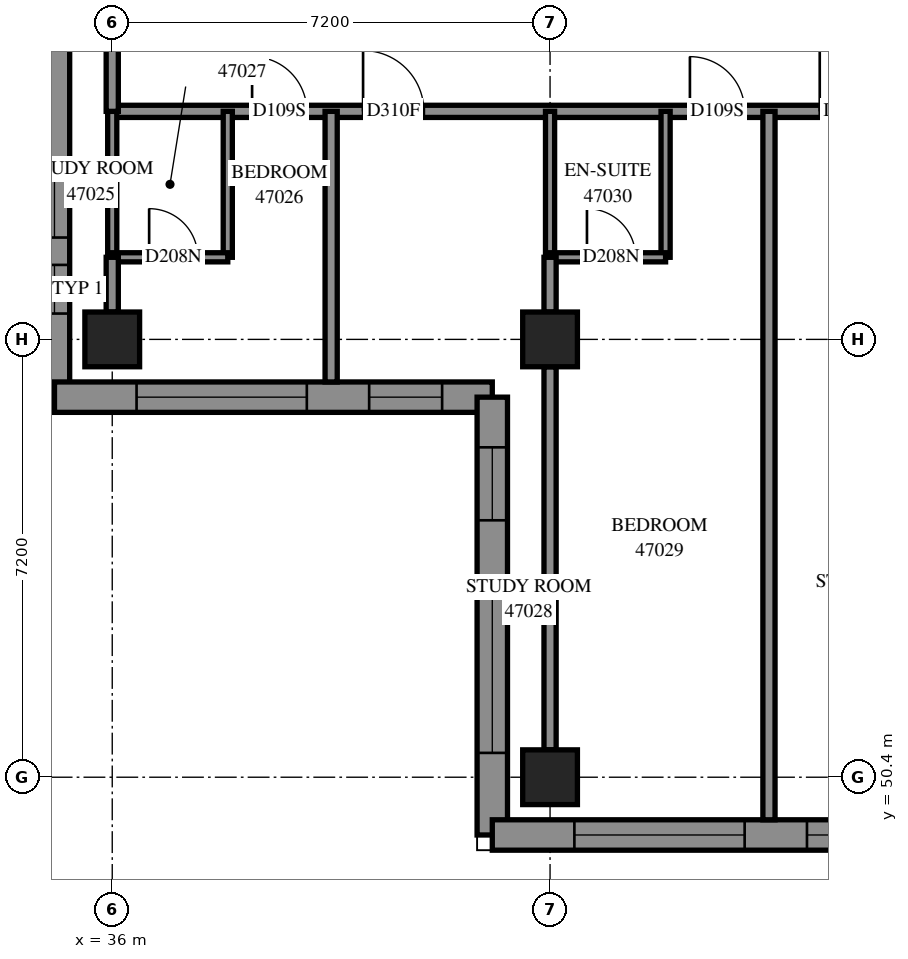
"""IFC4 building model, lengths in metres.
Left out: names, types, materials, properties, quantities, classifications, styles, units other than length and angle.
Written with IfcOpenShell. Run it as: python <this file> out.ifc"""

import sys

from ifc_helpers import new_model, si_unit, direction, frame, frame_2d, origin, origin_2d, place, context, subcontext, project, spatial, polyline, rectangle, outline, extrude, element, fill, save


model = new_model("IFC4")
c1 = context("Model", 3, precision=1e-05, world=origin(), true_north=direction((0.0, 1.0)))
c2 = subcontext(c1, "Body", "Model", "MODEL_VIEW")
j1 = project(units=[si_unit("LENGTHUNIT", "METRE"), si_unit("PLANEANGLEUNIT", "RADIAN")], contexts=[c1])
p1 = place(None, origin())
s1 = spatial("IfcSite", under=j1, at=p1, CompositionType="ELEMENT")
p2 = place(p1, origin())
s2 = spatial("IfcBuilding", under=s1, at=p2, CompositionType="ELEMENT")
p3 = place(p2, frame((0.0, 0.0, 172.8)))
s3 = spatial("IfcBuildingStorey", under=s2, at=p3, CompositionType="ELEMENT", Elevation=172.8)
for number, where, z_axis, x_axis in (
    (1, (36.0, 57.6, 0.0), (0.0, 0.0, 1.0), (1.0, 0.0, 0.0)),
    (2, (43.2, 50.4, 0.0), (0.0, 0.0, 1.0), (1.0, 0.0, 0.0)),
    (3, (43.2, 57.6, 0.0), (0.0, 0.0, 1.0), (1.0, 0.0, 0.0)),
):
    element("IfcColumn", number, at=place(p3, frame(where, z_axis=z_axis, x_axis=x_axis)), inside=s3, PredefinedType="COLUMN", context=c2, shape_type="SweptSolid", body=[
        extrude(rectangle(XDim=0.9, YDim=0.9, at=origin_2d()), origin(), (0.0, 0.0, 1.0), 3.1),
    ])
p4 = place(p3, frame((35.05, 62.617, 0.0), z_axis=(0.0, 0.0, 1.0), x_axis=(0.0, -1.0, 0.0)))
e4 = element("IfcWall", 4, at=p4, inside=s3, PredefinedType="SOLIDWALL", context=c2, shape_type="SweptSolid", body=[
    extrude(outline(polyline([(0.25, -0.25), (6.217, -0.25), (5.717, 0.25), (-0.25, 0.25), (0.25, -0.25)])), origin(), (0.0, 0.0, 1.0), 3.1),
])
p5 = place(p4, frame((2.042, 0.0, 0.45)))
e5 = element("IfcOpeningElement", 5, at=p5, cuts=e4, PredefinedType="OPENING", context=c2, shape_type="SweptSolid", body=[
    extrude(rectangle(XDim=1.3, YDim=2.5, at=frame_2d((0.65, 1.25))), frame((0.0, 0.26, 0.0), z_axis=(0.0, -1.0, 0.0), x_axis=(1.0, 0.0, 0.0)), (0.0, 0.0, 1.0), 0.52),
])
p6 = place(p4, frame((3.792, 0.0, 0.45)))
e6 = element("IfcOpeningElement", 6, at=p6, cuts=e4, PredefinedType="OPENING", context=c2, shape_type="SweptSolid", body=[
    extrude(rectangle(XDim=0.8, YDim=2.5, at=frame_2d((0.4, 1.25))), frame((0.0, 0.26, 0.0), z_axis=(0.0, -1.0, 0.0), x_axis=(1.0, 0.0, 0.0)), (0.0, 0.0, 1.0), 0.52),
])
p7 = place(p3, frame((35.05, 56.65, 0.0), z_axis=(0.0, 0.0, 1.0), x_axis=(1.0, 0.0, 0.0)))
e7 = element("IfcWall", 7, at=p7, inside=s3, PredefinedType="SOLIDWALL", context=c2, shape_type="SweptSolid", body=[
    extrude(outline(polyline([(-0.25, -0.25), (6.95, -0.25), (7.45, 0.25), (0.25, 0.25), (-0.25, -0.25)])), origin(), (0.0, 0.0, 1.0), 3.1),
])
p8 = place(p7, frame((1.35, 0.0, 0.45)))
e8 = element("IfcOpeningElement", 8, at=p8, cuts=e7, PredefinedType="OPENING", context=c2, shape_type="SweptSolid", body=[
    extrude(rectangle(XDim=2.8, YDim=2.5, at=frame_2d((1.4, 1.25))), frame((0.0, 0.26, 0.0), z_axis=(0.0, -1.0, 0.0), x_axis=(1.0, 0.0, 0.0)), (0.0, 0.0, 1.0), 0.52),
])
p9 = place(p7, frame((5.175, 0.0, 0.45)))
e9 = element("IfcOpeningElement", 9, at=p9, cuts=e7, PredefinedType="OPENING", context=c2, shape_type="SweptSolid", body=[
    extrude(rectangle(XDim=1.2, YDim=2.5, at=frame_2d((0.6, 1.25))), frame((0.0, 0.26, 0.0), z_axis=(0.0, -1.0, 0.0), x_axis=(1.0, 0.0, 0.0)), (0.0, 0.0, 1.0), 0.52),
])
p10 = place(p3, frame((42.25, 56.65, 0.0), z_axis=(0.0, 0.0, 1.0), x_axis=(0.0, -1.0, 0.0)))
e10 = element("IfcWall", 10, at=p10, inside=s3, PredefinedType="SOLIDWALL", context=c2, shape_type="SweptSolid", body=[
    extrude(outline(polyline([(0.25, -0.25), (7.45, -0.25), (6.95, 0.25), (-0.25, 0.25), (0.25, -0.25)])), origin(), (0.0, 0.0, 1.0), 3.1),
])
p11 = place(p10, frame((3.05, 0.0, 0.45)))
e11 = element("IfcOpeningElement", 11, at=p11, cuts=e10, PredefinedType="OPENING", context=c2, shape_type="SweptSolid", body=[
    extrude(rectangle(XDim=2.8, YDim=2.5, at=frame_2d((1.4, 1.25))), frame((0.0, 0.26, 0.0), z_axis=(0.0, -1.0, 0.0), x_axis=(1.0, 0.0, 0.0)), (0.0, 0.0, 1.0), 0.52),
])
p12 = place(p10, frame((0.825, 0.0, 0.45)))
e12 = element("IfcOpeningElement", 12, at=p12, cuts=e10, PredefinedType="OPENING", context=c2, shape_type="SweptSolid", body=[
    extrude(rectangle(XDim=1.2, YDim=2.5, at=frame_2d((0.6, 1.25))), frame((0.0, 0.26, 0.0), z_axis=(0.0, -1.0, 0.0), x_axis=(1.0, 0.0, 0.0)), (0.0, 0.0, 1.0), 0.52),
])
p13 = place(p3, frame((42.25, 49.45, 0.0), z_axis=(0.0, 0.0, 1.0), x_axis=(1.0, 0.0, 0.0)))
e13 = element("IfcWall", 13, at=p13, inside=s3, PredefinedType="SOLIDWALL", context=c2, shape_type="SweptSolid", body=[
    extrude(outline(polyline([(-0.25, -0.25), (6.95, -0.25), (7.45, 0.25), (0.25, 0.25), (-0.25, -0.25)])), origin(), (0.0, 0.0, 1.0), 3.1),
])
p14 = place(p13, frame((1.35, 0.0, 0.45)))
e14 = element("IfcOpeningElement", 14, at=p14, cuts=e13, PredefinedType="OPENING", context=c2, shape_type="SweptSolid", body=[
    extrude(rectangle(XDim=2.8, YDim=2.5, at=frame_2d((1.4, 1.25))), frame((0.0, 0.26, 0.0), z_axis=(0.0, -1.0, 0.0), x_axis=(1.0, 0.0, 0.0)), (0.0, 0.0, 1.0), 0.52),
])
p15 = place(p13, frame((5.175, 0.0, 0.45)))
e15 = element("IfcOpeningElement", 15, at=p15, cuts=e13, PredefinedType="OPENING", context=c2, shape_type="SweptSolid", body=[
    extrude(rectangle(XDim=1.2, YDim=2.5, at=frame_2d((0.6, 1.25))), frame((0.0, 0.26, 0.0), z_axis=(0.0, -1.0, 0.0), x_axis=(1.0, 0.0, 0.0)), (0.0, 0.0, 1.0), 0.52),
])
p16 = place(p3, frame((36.0, 61.35, 0.0), z_axis=(0.0, 0.0, 1.0), x_axis=(1.0, 0.0, 0.0)))
e16 = element("IfcWall", 16, at=p16, inside=s3, PredefinedType="PARTITIONING", context=c2, shape_type="SweptSolid", body=[
    extrude(rectangle(XDim=16.95, YDim=0.2, at=frame_2d((8.475, 0.0))), origin(), (0.0, 0.0, 1.0), 3.1),
])
p17 = place(p16, frame((2.3, 0.0, 0.0)))
e17 = element("IfcOpeningElement", 17, at=p17, cuts=e16, PredefinedType="OPENING", context=c2, shape_type="SweptSolid", body=[
    extrude(rectangle(XDim=0.9, YDim=2.1, at=frame_2d((0.45, 1.05))), frame((0.0, 0.11, 0.0), z_axis=(0.0, -1.0, 0.0), x_axis=(1.0, 0.0, 0.0)), (0.0, 0.0, 1.0), 0.22),
])
p18 = place(p16, frame((4.125, 0.0, 0.0)))
e18 = element("IfcOpeningElement", 18, at=p18, cuts=e16, PredefinedType="OPENING", context=c2, shape_type="SweptSolid", body=[
    extrude(rectangle(XDim=1.0, YDim=2.1, at=frame_2d((0.5, 1.05))), frame((0.0, 0.11, 0.0), z_axis=(0.0, -1.0, 0.0), x_axis=(1.0, 0.0, 0.0)), (0.0, 0.0, 1.0), 0.22),
])
p19 = place(p16, frame((9.5, 0.0, 0.0)))
e19 = element("IfcOpeningElement", 19, at=p19, cuts=e16, PredefinedType="OPENING", context=c2, shape_type="SweptSolid", body=[
    extrude(rectangle(XDim=0.9, YDim=2.1, at=frame_2d((0.45, 1.05))), frame((0.0, 0.11, 0.0), z_axis=(0.0, -1.0, 0.0), x_axis=(1.0, 0.0, 0.0)), (0.0, 0.0, 1.0), 0.22),
])
p20 = place(p16, frame((11.635, 0.0, 0.0)))
e20 = element("IfcOpeningElement", 20, at=p20, cuts=e16, PredefinedType="OPENING", context=c2, shape_type="SweptSolid", body=[
    extrude(rectangle(XDim=1.0, YDim=2.1, at=frame_2d((0.5, 1.05))), frame((0.0, 0.11, 0.0), z_axis=(0.0, -1.0, 0.0), x_axis=(1.0, 0.0, 0.0)), (0.0, 0.0, 1.0), 0.22),
])
p21 = place(p16, frame((15.803, 0.0, 0.0)))
e21 = element("IfcOpeningElement", 21, at=p21, cuts=e16, PredefinedType="OPENING", context=c2, shape_type="SweptSolid", body=[
    extrude(rectangle(XDim=1.0, YDim=2.1, at=frame_2d((0.5, 1.05))), frame((0.0, 0.11, 0.0), z_axis=(0.0, -1.0, 0.0), x_axis=(1.0, 0.0, 0.0)), (0.0, 0.0, 1.0), 0.22),
])
p22 = place(p3, frame((46.8, 49.7, 0.0), z_axis=(0.0, 0.0, 1.0), x_axis=(0.0, 1.0, 0.0)))
e22 = element("IfcWall", 22, at=p22, inside=s3, PredefinedType="PARTITIONING", context=c2, shape_type="SweptSolid", body=[
    extrude(rectangle(XDim=11.65, YDim=0.2, at=frame_2d((5.825, 0.0))), origin(), (0.0, 0.0, 1.0), 3.1),
])
p23 = place(p3, frame((43.2, 50.85, 0.0), z_axis=(0.0, 0.0, 1.0), x_axis=(0.0, 1.0, 0.0)))
e23 = element("IfcWall", 23, at=p23, inside=s3, PredefinedType="PARTITIONING", context=c2, shape_type="SweptSolid", body=[
    extrude(rectangle(XDim=6.3, YDim=0.2, at=frame_2d((3.15, 0.0))), origin(), (0.0, 0.0, 1.0), 2.6),
])
p24 = place(p3, frame((39.6, 56.9, 0.0), z_axis=(0.0, 0.0, 1.0), x_axis=(0.0, 1.0, 0.0)))
e24 = element("IfcWall", 24, at=p24, inside=s3, PredefinedType="PARTITIONING", context=c2, shape_type="SweptSolid", body=[
    extrude(rectangle(XDim=4.45, YDim=0.2, at=frame_2d((2.225, 0.0))), origin(), (0.0, 0.0, 1.0), 3.1),
])
p25 = place(p3, frame((37.9, 58.95, 0.0), z_axis=(0.0, 0.0, 1.0), x_axis=(0.0, 1.0, 0.0)))
e25 = element("IfcWall", 25, at=p25, inside=s3, PredefinedType="PARTITIONING", context=c2, shape_type="SweptSolid", body=[
    extrude(rectangle(XDim=2.4, YDim=0.15, at=frame_2d((1.2, 0.0))), origin(), (0.0, 0.0, 1.0), 3.1),
])
p26 = place(p3, frame((36.0, 58.95, 0.0), z_axis=(0.0, 0.0, 1.0), x_axis=(0.0, 1.0, 0.0)))
e26 = element("IfcWall", 26, at=p26, inside=s3, PredefinedType="PARTITIONING", context=c2, shape_type="SweptSolid", body=[
    extrude(rectangle(XDim=2.4, YDim=0.15, at=frame_2d((1.2, 0.0))), origin(), (0.0, 0.0, 1.0), 2.6),
])
for number, where, z_axis, x_axis in (
    (27, (45.1, 58.95, 0.0), (0.0, 0.0, 1.0), (0.0, 1.0, 0.0)),
    (28, (43.2, 58.95, 0.0), (0.0, 0.0, 1.0), (0.0, 1.0, 0.0)),
):
    element("IfcWall", number, at=place(p3, frame(where, z_axis=z_axis, x_axis=x_axis)), inside=s3, PredefinedType="PARTITIONING", context=c2, shape_type="SweptSolid", body=[
        extrude(rectangle(XDim=2.4, YDim=0.15, at=frame_2d((1.2, 0.0))), origin(), (0.0, 0.0, 1.0), 3.1),
    ])
p27 = place(p3, frame((36.0, 61.35, 0.0), z_axis=(0.0, 0.0, 1.0), x_axis=(0.0, 1.0, 0.0)))
e29 = element("IfcWall", 29, at=p27, inside=s3, PredefinedType="PARTITIONING", context=c2, shape_type="SweptSolid", body=[
    extrude(rectangle(XDim=2.1, YDim=0.2, at=frame_2d((1.05, 0.0))), origin(), (0.0, 0.0, 1.0), 2.6),
])
p28 = place(p3, frame((36.0, 58.95, 0.0), z_axis=(0.0, 0.0, 1.0), x_axis=(1.0, 0.0, 0.0)))
e30 = element("IfcWall", 30, at=p28, inside=s3, PredefinedType="PARTITIONING", context=c2, shape_type="SweptSolid", body=[
    extrude(rectangle(XDim=1.9, YDim=0.15, at=frame_2d((0.95, 0.0))), origin(), (0.0, 0.0, 1.0), 3.1),
])
p29 = place(p28, frame((0.607, 0.0, 0.0)))
e31 = element("IfcOpeningElement", 31, at=p29, cuts=e30, PredefinedType="OPENING", context=c2, shape_type="SweptSolid", body=[
    extrude(rectangle(XDim=0.8, YDim=2.1, at=frame_2d((0.4, 1.05))), frame((0.0, 0.085, 0.0), z_axis=(0.0, -1.0, 0.0), x_axis=(1.0, 0.0, 0.0)), (0.0, 0.0, 1.0), 0.17),
])
p30 = place(p3, frame((43.2, 58.95, 0.0), z_axis=(0.0, 0.0, 1.0), x_axis=(1.0, 0.0, 0.0)))
e32 = element("IfcWall", 32, at=p30, inside=s3, PredefinedType="PARTITIONING", context=c2, shape_type="SweptSolid", body=[
    extrude(rectangle(XDim=1.9, YDim=0.15, at=frame_2d((0.95, 0.0))), origin(), (0.0, 0.0, 1.0), 3.1),
])
p31 = place(p30, frame((0.607, 0.0, 0.0)))
e33 = element("IfcOpeningElement", 33, at=p31, cuts=e32, PredefinedType="OPENING", context=c2, shape_type="SweptSolid", body=[
    extrude(rectangle(XDim=0.8, YDim=2.1, at=frame_2d((0.4, 1.05))), frame((0.0, 0.085, 0.0), z_axis=(0.0, -1.0, 0.0), x_axis=(1.0, 0.0, 0.0)), (0.0, 0.0, 1.0), 0.17),
])
p32 = place(p3, frame((36.0, 58.05, 0.0), z_axis=(0.0, 0.0, 1.0), x_axis=(0.0, 1.0, 0.0)))
e34 = element("IfcWall", 34, at=p32, inside=s3, PredefinedType="PARTITIONING", context=c2, shape_type="SweptSolid", body=[
    extrude(rectangle(XDim=0.9, YDim=0.2, at=frame_2d((0.45, 0.0))), origin(), (0.0, 0.0, 1.0), 2.6),
])
p33 = place(p3, frame((43.2, 58.05, 0.0), z_axis=(0.0, 0.0, 1.0), x_axis=(0.0, 1.0, 0.0)))
e35 = element("IfcWall", 35, at=p33, inside=s3, PredefinedType="PARTITIONING", context=c2, shape_type="SweptSolid", body=[
    extrude(rectangle(XDim=0.9, YDim=0.2, at=frame_2d((0.45, 0.0))), origin(), (0.0, 0.0, 1.0), 3.1),
])
p34 = place(p8, origin())
e36 = element("IfcWindow", 36, at=p34, inside=s3, PartitioningType="SINGLE_PANEL", PredefinedType="WINDOW", context=c2, shape_type="SweptSolid", body=[
    extrude(rectangle(XDim=2.8, YDim=2.5, at=frame_2d((1.4, 1.25))), frame((0.0, 0.18, 0.0), z_axis=(0.0, -1.0, 0.0), x_axis=(1.0, 0.0, 0.0)), (0.0, 0.0, 1.0), 0.06),
])
fill(e8, e36)
p35 = place(p9, origin())
e37 = element("IfcWindow", 37, at=p35, inside=s3, PartitioningType="SINGLE_PANEL", PredefinedType="WINDOW", context=c2, shape_type="SweptSolid", body=[
    extrude(rectangle(XDim=1.2, YDim=2.5, at=frame_2d((0.6, 1.25))), frame((0.0, 0.18, 0.0), z_axis=(0.0, -1.0, 0.0), x_axis=(1.0, 0.0, 0.0)), (0.0, 0.0, 1.0), 0.06),
])
fill(e9, e37)
p36 = place(p11, origin())
e38 = element("IfcWindow", 38, at=p36, inside=s3, PartitioningType="SINGLE_PANEL", PredefinedType="WINDOW", context=c2, shape_type="SweptSolid", body=[
    extrude(rectangle(XDim=2.8, YDim=2.5, at=frame_2d((1.4, 1.25))), frame((0.0, 0.18, 0.0), z_axis=(0.0, -1.0, 0.0), x_axis=(1.0, 0.0, 0.0)), (0.0, 0.0, 1.0), 0.06),
])
fill(e11, e38)
p37 = place(p12, origin())
e39 = element("IfcWindow", 39, at=p37, inside=s3, PartitioningType="SINGLE_PANEL", PredefinedType="WINDOW", context=c2, shape_type="SweptSolid", body=[
    extrude(rectangle(XDim=1.2, YDim=2.5, at=frame_2d((0.6, 1.25))), frame((0.0, 0.18, 0.0), z_axis=(0.0, -1.0, 0.0), x_axis=(1.0, 0.0, 0.0)), (0.0, 0.0, 1.0), 0.06),
])
fill(e12, e39)
p38 = place(p14, origin())
e40 = element("IfcWindow", 40, at=p38, inside=s3, PartitioningType="SINGLE_PANEL", PredefinedType="WINDOW", context=c2, shape_type="SweptSolid", body=[
    extrude(rectangle(XDim=2.8, YDim=2.5, at=frame_2d((1.4, 1.25))), frame((0.0, 0.18, 0.0), z_axis=(0.0, -1.0, 0.0), x_axis=(1.0, 0.0, 0.0)), (0.0, 0.0, 1.0), 0.06),
])
fill(e14, e40)
p39 = place(p15, origin())
e41 = element("IfcWindow", 41, at=p39, inside=s3, PartitioningType="SINGLE_PANEL", PredefinedType="WINDOW", context=c2, shape_type="SweptSolid", body=[
    extrude(rectangle(XDim=1.2, YDim=2.5, at=frame_2d((0.6, 1.25))), frame((0.0, 0.18, 0.0), z_axis=(0.0, -1.0, 0.0), x_axis=(1.0, 0.0, 0.0)), (0.0, 0.0, 1.0), 0.06),
])
fill(e15, e41)
p40 = place(p17, origin())
e42 = element("IfcDoor", 42, at=p40, inside=s3, OperationType="SINGLE_SWING_LEFT", PredefinedType="DOOR", context=c2, shape_type="SweptSolid", body=[
    extrude(rectangle(XDim=0.9, YDim=2.1, at=frame_2d((0.45, 1.05))), frame((0.0, 0.025, 0.0), z_axis=(0.0, -1.0, 0.0), x_axis=(1.0, 0.0, 0.0)), (0.0, 0.0, 1.0), 0.05),
])
fill(e17, e42)
p41 = place(p29, origin())
e43 = element("IfcDoor", 43, at=p41, inside=s3, OperationType="SINGLE_SWING_RIGHT", PredefinedType="DOOR", context=c2, shape_type="SweptSolid", body=[
    extrude(rectangle(XDim=0.8, YDim=2.1, at=frame_2d((0.4, 1.05))), frame((0.0, 0.025, 0.0), z_axis=(0.0, -1.0, 0.0), x_axis=(1.0, 0.0, 0.0)), (0.0, 0.0, 1.0), 0.05),
])
fill(e31, e43)
p42 = place(p18, origin())
e44 = element("IfcDoor", 44, at=p42, inside=s3, OperationType="SINGLE_SWING_RIGHT", PredefinedType="DOOR", context=c2, shape_type="SweptSolid", body=[
    extrude(rectangle(XDim=1.0, YDim=2.1, at=frame_2d((0.5, 1.05))), frame((0.0, 0.025, 0.0), z_axis=(0.0, -1.0, 0.0), x_axis=(1.0, 0.0, 0.0)), (0.0, 0.0, 1.0), 0.05),
])
fill(e18, e44)
p43 = place(p19, origin())
e45 = element("IfcDoor", 45, at=p43, inside=s3, OperationType="SINGLE_SWING_LEFT", PredefinedType="DOOR", context=c2, shape_type="SweptSolid", body=[
    extrude(rectangle(XDim=0.9, YDim=2.1, at=frame_2d((0.45, 1.05))), frame((0.0, 0.025, 0.0), z_axis=(0.0, -1.0, 0.0), x_axis=(1.0, 0.0, 0.0)), (0.0, 0.0, 1.0), 0.05),
])
fill(e19, e45)
p44 = place(p31, origin())
e46 = element("IfcDoor", 46, at=p44, inside=s3, OperationType="SINGLE_SWING_RIGHT", PredefinedType="DOOR", context=c2, shape_type="SweptSolid", body=[
    extrude(rectangle(XDim=0.8, YDim=2.1, at=frame_2d((0.4, 1.05))), frame((0.0, 0.025, 0.0), z_axis=(0.0, -1.0, 0.0), x_axis=(1.0, 0.0, 0.0)), (0.0, 0.0, 1.0), 0.05),
])
fill(e33, e46)
p45 = place(p20, origin())
e47 = element("IfcDoor", 47, at=p45, inside=s3, OperationType="SINGLE_SWING_RIGHT", PredefinedType="DOOR", context=c2, shape_type="SweptSolid", body=[
    extrude(rectangle(XDim=1.0, YDim=2.1, at=frame_2d((0.5, 1.05))), frame((0.0, 0.025, 0.0), z_axis=(0.0, -1.0, 0.0), x_axis=(1.0, 0.0, 0.0)), (0.0, 0.0, 1.0), 0.05),
])
fill(e20, e47)
p46 = place(p5, origin())
e48 = element("IfcWindow", 48, at=p46, inside=s3, PartitioningType="SINGLE_PANEL", PredefinedType="WINDOW", context=c2, shape_type="SweptSolid", body=[
    extrude(rectangle(XDim=1.3, YDim=2.5, at=frame_2d((0.65, 1.25))), frame((0.0, 0.18, 0.0), z_axis=(0.0, -1.0, 0.0), x_axis=(1.0, 0.0, 0.0)), (0.0, 0.0, 1.0), 0.06),
])
fill(e5, e48)
p47 = place(p6, origin())
e49 = element("IfcWindow", 49, at=p47, inside=s3, PartitioningType="SINGLE_PANEL", PredefinedType="WINDOW", context=c2, shape_type="SweptSolid", body=[
    extrude(rectangle(XDim=0.8, YDim=2.5, at=frame_2d((0.4, 1.25))), frame((0.0, 0.18, 0.0), z_axis=(0.0, -1.0, 0.0), x_axis=(1.0, 0.0, 0.0)), (0.0, 0.0, 1.0), 0.06),
])
fill(e6, e49)
save(model, sys.argv[1])
